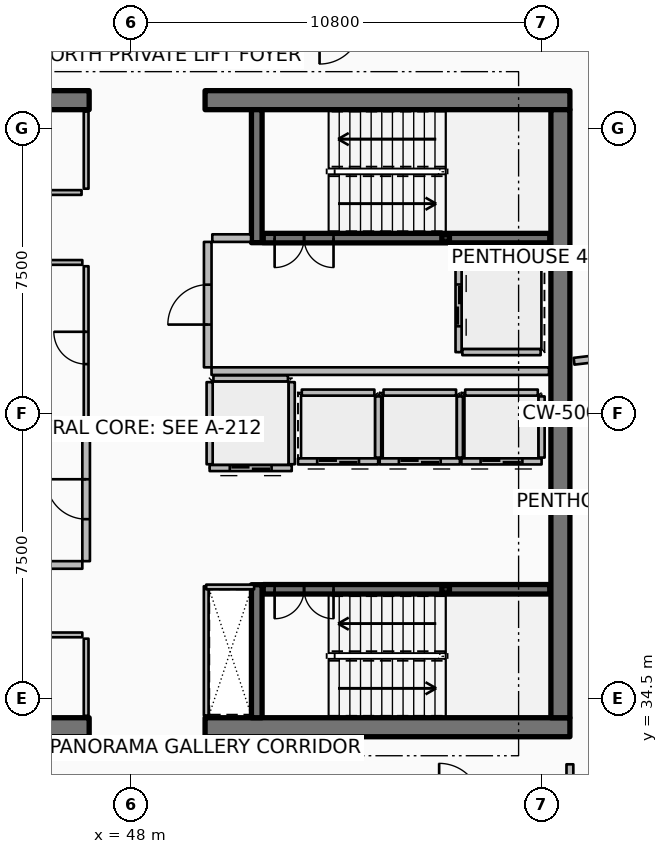
"""IFC4 building model, lengths in metres.
Left out: names, types, materials, properties, quantities, classifications, styles, units other than length and angle.
Written with IfcOpenShell. Run it as: python <this file> out.ifc"""

import sys

from ifc_helpers import new_model, si_unit, direction, frame, frame_2d, origin, origin_2d, place, context, subcontext, project, spatial, rectangle, hollow_rectangle, extrude, element, fill, save


model = new_model("IFC4")
c1 = context("Model", 3, precision=1e-05, world=origin(), true_north=direction((0.0, 1.0)))
c2 = subcontext(c1, "Body", "Model", "MODEL_VIEW")
j1 = project(units=[si_unit("LENGTHUNIT", "METRE"), si_unit("PLANEANGLEUNIT", "RADIAN")], contexts=[c1])
p1 = place(None, origin())
s1 = spatial("IfcSite", under=j1, at=p1, CompositionType="ELEMENT")
p2 = place(p1, origin())
s2 = spatial("IfcBuilding", under=s1, at=p2, CompositionType="ELEMENT")
p3 = place(p2, frame((0.0, 0.0, 338.9)))
s3 = spatial("IfcBuildingStorey", under=s2, at=p3, CompositionType="ELEMENT", Elevation=338.9)
p4 = place(p3, frame((37.3, 33.75, 0.0), z_axis=(0.0, 0.0, 1.0), x_axis=(1.0, 0.0, 0.0)))
e1 = element("IfcWall", 1, at=p4, inside=s3, PredefinedType="SHEAR", context=c2, shape_type="SweptSolid", body=[
    extrude(rectangle(XDim=9.6, YDim=0.5, at=frame_2d((4.8, 0.0))), origin(), (0.0, 0.0, 1.0), 4.2),
])
p5 = place(p3, frame((49.95, 33.75, 0.0), z_axis=(0.0, 0.0, 1.0), x_axis=(1.0, 0.0, 0.0)))
e2 = element("IfcWall", 2, at=p5, inside=s3, PredefinedType="SHEAR", context=c2, shape_type="SweptSolid", body=[
    extrude(rectangle(XDim=9.6, YDim=0.5, at=frame_2d((4.8, 0.0))), origin(), (0.0, 0.0, 1.0), 4.2),
])
p6 = place(p3, frame((37.3, 50.25, 0.0), z_axis=(0.0, 0.0, 1.0), x_axis=(1.0, 0.0, 0.0)))
e3 = element("IfcWall", 3, at=p6, inside=s3, PredefinedType="SHEAR", context=c2, shape_type="SweptSolid", body=[
    extrude(rectangle(XDim=9.6, YDim=0.5, at=frame_2d((4.8, 0.0))), origin(), (0.0, 0.0, 1.0), 4.2),
])
p7 = place(p3, frame((49.95, 50.25, 0.0), z_axis=(0.0, 0.0, 1.0), x_axis=(1.0, 0.0, 0.0)))
e4 = element("IfcWall", 4, at=p7, inside=s3, PredefinedType="SHEAR", context=c2, shape_type="SweptSolid", body=[
    extrude(rectangle(XDim=9.6, YDim=0.5, at=frame_2d((4.8, 0.0))), origin(), (0.0, 0.0, 1.0), 4.2),
])
p8 = place(p3, frame((59.3, 34.0, 0.0), z_axis=(0.0, 0.0, 1.0), x_axis=(0.0, 1.0, 0.0)))
e5 = element("IfcWall", 5, at=p8, inside=s3, PredefinedType="SHEAR", context=c2, shape_type="SweptSolid", body=[
    extrude(rectangle(XDim=16.0, YDim=0.5, at=frame_2d((8.0, 0.0))), origin(), (0.0, 0.0, 1.0), 4.2),
])
for number, where, z_axis, x_axis in (
    (6, (51.31, 46.5, 0.0), (0.0, 0.0, 1.0), (0.0, 1.0, 0.0)),
    (7, (51.31, 34.0, 0.0), (0.0, 0.0, 1.0), (0.0, 1.0, 0.0)),
):
    element("IfcWall", number, at=place(p3, frame(where, z_axis=z_axis, x_axis=x_axis)), inside=s3, PredefinedType="SHEAR", context=c2, shape_type="SweptSolid", body=[
        extrude(rectangle(XDim=3.5, YDim=0.28, at=frame_2d((1.75, 0.0))), origin(), (0.0, 0.0, 1.0), 4.2),
    ])
for number, where, z_axis, x_axis in (
    (8, (56.28, 46.62, 0.0), (0.0, 0.0, 1.0), (1.0, 0.0, 0.0)),
    (9, (56.28, 37.38, 0.0), (0.0, 0.0, 1.0), (1.0, 0.0, 0.0)),
):
    element("IfcColumn", number, at=place(p3, frame(where, z_axis=z_axis, x_axis=x_axis)), inside=s3, PredefinedType="COLUMN", context=c2, shape_type="SweptSolid", body=[
        extrude(hollow_rectangle(XDim=0.2, YDim=0.2, WallThickness=0.01, InnerFilletRadius=0.01, OuterFilletRadius=0.02, at=origin_2d()), origin(), (0.0, 0.0, 1.0), 1.895),
    ])
p9 = place(p3, frame((51.48, 46.62, 0.0), z_axis=(0.0, 0.0, 1.0), x_axis=(1.0, 0.0, 0.0)))
e10 = element("IfcWall", 10, at=p9, inside=s3, PredefinedType="SOLIDWALL", context=c2, shape_type="SweptSolid", body=[
    extrude(rectangle(XDim=7.54, YDim=0.25, at=frame_2d((3.77, 0.0))), origin(), (0.0, 0.0, 1.0), 3.8),
])
p10 = place(p9, frame((0.3, 0.0, 0.0)))
e11 = element("IfcOpeningElement", 11, at=p10, cuts=e10, PredefinedType="OPENING", context=c2, shape_type="SweptSolid", body=[
    extrude(rectangle(XDim=1.55, YDim=2.15, at=frame_2d((0.775, 1.075))), frame((0.0, 0.135, 0.0), z_axis=(0.0, -1.0, 0.0), x_axis=(1.0, 0.0, 0.0)), (0.0, 0.0, 1.0), 0.27),
])
p11 = place(p3, frame((51.48, 37.38, 0.0), z_axis=(0.0, 0.0, 1.0), x_axis=(1.0, 0.0, 0.0)))
e12 = element("IfcWall", 12, at=p11, inside=s3, PredefinedType="SOLIDWALL", context=c2, shape_type="SweptSolid", body=[
    extrude(rectangle(XDim=7.54, YDim=0.25, at=frame_2d((3.77, 0.0))), origin(), (0.0, 0.0, 1.0), 3.8),
])
p12 = place(p11, frame((0.3, 0.0, 0.0)))
e13 = element("IfcOpeningElement", 13, at=p12, cuts=e12, PredefinedType="OPENING", context=c2, shape_type="SweptSolid", body=[
    extrude(rectangle(XDim=1.55, YDim=2.15, at=frame_2d((0.775, 1.075))), frame((0.0, 0.135, 0.0), z_axis=(0.0, -1.0, 0.0), x_axis=(1.0, 0.0, 0.0)), (0.0, 0.0, 1.0), 0.27),
])
p13 = place(p3, frame((54.505, 40.745, 0.0), z_axis=(0.0, 0.0, 1.0), x_axis=(-1.0, 0.0, 0.0)))
e14 = element("IfcWall", 14, at=p13, inside=s3, PredefinedType="PARTITIONING", context=c2, shape_type="SweptSolid", body=[
    extrude(rectangle(XDim=2.11, YDim=0.16, at=frame_2d((1.055, 0.0))), origin(), (0.0, 0.0, 1.0), 3.8),
])
p14 = place(p13, frame((0.505, 0.0, 0.0)))
e15 = element("IfcOpeningElement", 15, at=p14, cuts=e14, PredefinedType="OPENING", context=c2, shape_type="SweptSolid", body=[
    extrude(rectangle(XDim=1.1, YDim=2.1, at=frame_2d((0.55, 1.05))), frame((0.0, 0.09, 0.0), z_axis=(0.0, -1.0, 0.0), x_axis=(1.0, 0.0, 0.0)), (0.0, 0.0, 1.0), 0.18),
])
p15 = place(p3, frame((54.505, 40.845, 0.0), z_axis=(0.0, 0.0, 1.0), x_axis=(0.0, 1.0, 0.0)))
e16 = element("IfcWall", 16, at=p15, inside=s3, PredefinedType="PARTITIONING", context=c2, shape_type="SweptSolid", body=[
    extrude(rectangle(XDim=1.61, YDim=0.16, at=frame_2d((0.805, 0.0))), origin(), (0.0, 0.0, 1.0), 3.8),
])
p16 = place(p3, frame((52.495, 42.555, 0.0), z_axis=(0.0, 0.0, 1.0), x_axis=(1.0, 0.0, 0.0)))
e17 = element("IfcWall", 17, at=p16, inside=s3, PredefinedType="PARTITIONING", context=c2, shape_type="SweptSolid", body=[
    extrude(rectangle(XDim=1.91, YDim=0.16, at=frame_2d((0.955, 0.0))), origin(), (0.0, 0.0, 1.0), 3.8),
])
p17 = place(p3, frame((56.655, 40.745, 0.0), z_axis=(0.0, 0.0, 1.0), x_axis=(-1.0, 0.0, 0.0)))
e18 = element("IfcWall", 18, at=p17, inside=s3, PredefinedType="PARTITIONING", context=c2, shape_type="SweptSolid", body=[
    extrude(rectangle(XDim=2.11, YDim=0.16, at=frame_2d((1.055, 0.0))), origin(), (0.0, 0.0, 1.0), 3.8),
])
p18 = place(p17, frame((0.505, 0.0, 0.0)))
e19 = element("IfcOpeningElement", 19, at=p18, cuts=e18, PredefinedType="OPENING", context=c2, shape_type="SweptSolid", body=[
    extrude(rectangle(XDim=1.1, YDim=2.1, at=frame_2d((0.55, 1.05))), frame((0.0, 0.09, 0.0), z_axis=(0.0, -1.0, 0.0), x_axis=(1.0, 0.0, 0.0)), (0.0, 0.0, 1.0), 0.18),
])
p19 = place(p3, frame((56.655, 40.845, 0.0), z_axis=(0.0, 0.0, 1.0), x_axis=(0.0, 1.0, 0.0)))
e20 = element("IfcWall", 20, at=p19, inside=s3, PredefinedType="PARTITIONING", context=c2, shape_type="SweptSolid", body=[
    extrude(rectangle(XDim=1.61, YDim=0.16, at=frame_2d((0.805, 0.0))), origin(), (0.0, 0.0, 1.0), 3.8),
])
p20 = place(p3, frame((54.645, 42.555, 0.0), z_axis=(0.0, 0.0, 1.0), x_axis=(1.0, 0.0, 0.0)))
e21 = element("IfcWall", 21, at=p20, inside=s3, PredefinedType="PARTITIONING", context=c2, shape_type="SweptSolid", body=[
    extrude(rectangle(XDim=1.91, YDim=0.16, at=frame_2d((0.955, 0.0))), origin(), (0.0, 0.0, 1.0), 3.8),
])
p21 = place(p3, frame((58.805, 40.745, 0.0), z_axis=(0.0, 0.0, 1.0), x_axis=(-1.0, 0.0, 0.0)))
e22 = element("IfcWall", 22, at=p21, inside=s3, PredefinedType="PARTITIONING", context=c2, shape_type="SweptSolid", body=[
    extrude(rectangle(XDim=2.11, YDim=0.16, at=frame_2d((1.055, 0.0))), origin(), (0.0, 0.0, 1.0), 3.8),
])
p22 = place(p21, frame((0.505, 0.0, 0.0)))
e23 = element("IfcOpeningElement", 23, at=p22, cuts=e22, PredefinedType="OPENING", context=c2, shape_type="SweptSolid", body=[
    extrude(rectangle(XDim=1.1, YDim=2.1, at=frame_2d((0.55, 1.05))), frame((0.0, 0.09, 0.0), z_axis=(0.0, -1.0, 0.0), x_axis=(1.0, 0.0, 0.0)), (0.0, 0.0, 1.0), 0.18),
])
p23 = place(p3, frame((58.805, 40.845, 0.0), z_axis=(0.0, 0.0, 1.0), x_axis=(0.0, 1.0, 0.0)))
e24 = element("IfcWall", 24, at=p23, inside=s3, PredefinedType="PARTITIONING", context=c2, shape_type="SweptSolid", body=[
    extrude(rectangle(XDim=1.61, YDim=0.16, at=frame_2d((0.805, 0.0))), origin(), (0.0, 0.0, 1.0), 3.8),
])
p24 = place(p3, frame((56.795, 42.555, 0.0), z_axis=(0.0, 0.0, 1.0), x_axis=(1.0, 0.0, 0.0)))
e25 = element("IfcWall", 25, at=p24, inside=s3, PredefinedType="PARTITIONING", context=c2, shape_type="SweptSolid", body=[
    extrude(rectangle(XDim=1.91, YDim=0.16, at=frame_2d((0.955, 0.0))), origin(), (0.0, 0.0, 1.0), 3.8),
])
p25 = place(p3, frame((56.62, 46.08, 0.0), z_axis=(0.0, 0.0, 1.0), x_axis=(0.0, -1.0, 0.0)))
e26 = element("IfcWall", 26, at=p25, inside=s3, PredefinedType="PARTITIONING", context=c2, shape_type="SweptSolid", body=[
    extrude(rectangle(XDim=2.46, YDim=0.16, at=frame_2d((1.23, 0.0))), origin(), (0.0, 0.0, 1.0), 3.8),
])
p26 = place(p25, frame((0.68, 0.0, 0.0)))
e27 = element("IfcOpeningElement", 27, at=p26, cuts=e26, PredefinedType="OPENING", context=c2, shape_type="SweptSolid", body=[
    extrude(rectangle(XDim=1.1, YDim=2.1, at=frame_2d((0.55, 1.05))), frame((0.0, 0.09, 0.0), z_axis=(0.0, -1.0, 0.0), x_axis=(1.0, 0.0, 0.0)), (0.0, 0.0, 1.0), 0.18),
])
for number, where, z_axis, x_axis in (
    (28, (56.72, 46.08, 0.0), (0.0, 0.0, 1.0), (1.0, 0.0, 0.0)),
    (29, (56.72, 43.62, 0.0), (0.0, 0.0, 1.0), (1.0, 0.0, 0.0)),
):
    element("IfcWall", number, at=place(p3, frame(where, z_axis=z_axis, x_axis=x_axis)), inside=s3, PredefinedType="PARTITIONING", context=c2, shape_type="SweptSolid", body=[
        extrude(rectangle(XDim=2.06, YDim=0.16, at=frame_2d((1.03, 0.0))), origin(), (0.0, 0.0, 1.0), 3.8),
    ])
p27 = place(p3, frame((52.23, 40.57, 0.0), z_axis=(0.0, 0.0, 1.0), x_axis=(-1.0, 0.0, 0.0)))
e30 = element("IfcWall", 30, at=p27, inside=s3, PredefinedType="PARTITIONING", context=c2, shape_type="SweptSolid", body=[
    extrude(rectangle(XDim=2.16, YDim=0.16, at=frame_2d((1.08, 0.0))), origin(), (0.0, 0.0, 1.0), 3.8),
])
p28 = place(p27, frame((0.53, 0.0, 0.0)))
e31 = element("IfcOpeningElement", 31, at=p28, cuts=e30, PredefinedType="OPENING", context=c2, shape_type="SweptSolid", body=[
    extrude(rectangle(XDim=1.1, YDim=2.1, at=frame_2d((0.55, 1.05))), frame((0.0, 0.09, 0.0), z_axis=(0.0, -1.0, 0.0), x_axis=(1.0, 0.0, 0.0)), (0.0, 0.0, 1.0), 0.18),
])
for number, where, z_axis, x_axis in (
    (32, (52.23, 40.67, 0.0), (0.0, 0.0, 1.0), (0.0, 1.0, 0.0)),
    (33, (50.07, 40.67, 0.0), (0.0, 0.0, 1.0), (0.0, 1.0, 0.0)),
):
    element("IfcWall", number, at=place(p3, frame(where, z_axis=z_axis, x_axis=x_axis)), inside=s3, PredefinedType="PARTITIONING", context=c2, shape_type="SweptSolid", body=[
        extrude(rectangle(XDim=2.16, YDim=0.16, at=frame_2d((1.08, 0.0))), origin(), (0.0, 0.0, 1.0), 3.8),
    ])
p29 = place(p3, frame((50.17, 42.93, 0.0), z_axis=(0.0, 0.0, 1.0), x_axis=(1.0, 0.0, 0.0)))
e34 = element("IfcWall", 34, at=p29, inside=s3, PredefinedType="PARTITIONING", context=c2, shape_type="SweptSolid", body=[
    extrude(rectangle(XDim=1.96, YDim=0.16, at=frame_2d((0.98, 0.0))), origin(), (0.0, 0.0, 1.0), 3.8),
])
p30 = place(p3, frame((46.82, 34.05, 0.0), z_axis=(0.0, 0.0, 1.0), x_axis=(0.0, 1.0, 0.0)))
e35 = element("IfcWall", 35, at=p30, inside=s3, PredefinedType="PARTITIONING", context=c2, shape_type="SweptSolid", body=[
    extrude(rectangle(XDim=2.03, YDim=0.125, at=frame_2d((1.015, 0.0))), origin(), (0.0, 0.0, 1.0), 3.24),
])
p31 = place(p3, frame((42.6, 36.18, 0.0), z_axis=(0.0, 0.0, 1.0), x_axis=(1.0, 0.0, 0.0)))
e36 = element("IfcWall", 36, at=p31, inside=s3, PredefinedType="PARTITIONING", context=c2, shape_type="SweptSolid", body=[
    extrude(rectangle(XDim=4.12, YDim=0.125, at=frame_2d((2.06, 0.0))), origin(), (0.0, 0.0, 1.0), 3.24),
])
p32 = place(p31, frame((1.635, 0.0, 0.0)))
e37 = element("IfcOpeningElement", 37, at=p32, cuts=e36, PredefinedType="OPENING", context=c2, shape_type="SweptSolid", body=[
    extrude(rectangle(XDim=0.85, YDim=2.06, at=frame_2d((0.425, 1.03))), frame((0.0, 0.073, 0.0), z_axis=(0.0, -1.0, 0.0), x_axis=(1.0, 0.0, 0.0)), (0.0, 0.0, 1.0), 0.145),
])
p33 = place(p3, frame((46.82, 47.92, 0.0), z_axis=(0.0, 0.0, 1.0), x_axis=(0.0, 1.0, 0.0)))
e38 = element("IfcWall", 38, at=p33, inside=s3, PredefinedType="PARTITIONING", context=c2, shape_type="SweptSolid", body=[
    extrude(rectangle(XDim=2.03, YDim=0.125, at=frame_2d((1.015, 0.0))), origin(), (0.0, 0.0, 1.0), 3.24),
])
p34 = place(p3, frame((37.92, 47.82, 0.0), z_axis=(0.0, 0.0, 1.0), x_axis=(1.0, 0.0, 0.0)))
e39 = element("IfcWall", 39, at=p34, inside=s3, PredefinedType="PARTITIONING", context=c2, shape_type="SweptSolid", body=[
    extrude(rectangle(XDim=8.78, YDim=0.125, at=frame_2d((4.39, 0.0))), origin(), (0.0, 0.0, 1.0), 3.24),
])
p35 = place(p34, frame((3.965, 0.0, 0.0)))
e40 = element("IfcOpeningElement", 40, at=p35, cuts=e39, PredefinedType="OPENING", context=c2, shape_type="SweptSolid", body=[
    extrude(rectangle(XDim=0.85, YDim=2.06, at=frame_2d((0.425, 1.03))), frame((0.0, 0.073, 0.0), z_axis=(0.0, -1.0, 0.0), x_axis=(1.0, 0.0, 0.0)), (0.0, 0.0, 1.0), 0.145),
])
p36 = place(p3, frame((41.35, 38.02, 0.0), z_axis=(0.0, 0.0, 1.0), x_axis=(1.0, 0.0, 0.0)))
e41 = element("IfcWall", 41, at=p36, inside=s3, PredefinedType="PARTITIONING", context=c2, shape_type="SweptSolid", body=[
    extrude(rectangle(XDim=5.37, YDim=0.2, at=frame_2d((2.685, 0.0))), origin(), (0.0, 0.0, 1.0), 3.8),
])
p37 = place(p3, frame((43.92, 41.48, 0.0), z_axis=(0.0, 0.0, 1.0), x_axis=(1.0, 0.0, 0.0)))
e42 = element("IfcWall", 42, at=p37, inside=s3, PredefinedType="PARTITIONING", context=c2, shape_type="SweptSolid", body=[
    extrude(rectangle(XDim=2.8, YDim=0.2, at=frame_2d((1.4, 0.0))), origin(), (0.0, 0.0, 1.0), 3.8),
])
p38 = place(p3, frame((46.82, 38.12, 0.0), z_axis=(0.0, 0.0, 1.0), x_axis=(0.0, 1.0, 0.0)))
e43 = element("IfcWall", 43, at=p38, inside=s3, PredefinedType="PARTITIONING", context=c2, shape_type="SweptSolid", body=[
    extrude(rectangle(XDim=3.26, YDim=0.2, at=frame_2d((1.63, 0.0))), origin(), (0.0, 0.0, 1.0), 3.8),
])
p39 = place(p38, frame((1.105, 0.0, 0.0)))
e44 = element("IfcOpeningElement", 44, at=p39, cuts=e43, PredefinedType="OPENING", context=c2, shape_type="SweptSolid", body=[
    extrude(rectangle(XDim=1.05, YDim=2.1, at=frame_2d((0.525, 1.05))), frame((0.0, 0.11, 0.0), z_axis=(0.0, -1.0, 0.0), x_axis=(1.0, 0.0, 0.0)), (0.0, 0.0, 1.0), 0.22),
])
p40 = place(p3, frame((50.12, 43.12, 0.0), z_axis=(0.0, 0.0, 1.0), x_axis=(1.0, 0.0, 0.0)))
e45 = element("IfcWall", 45, at=p40, inside=s3, PredefinedType="PARTITIONING", context=c2, shape_type="SweptSolid", body=[
    extrude(rectangle(XDim=8.88, YDim=0.2, at=frame_2d((4.44, 0.0))), origin(), (0.0, 0.0, 1.0), 3.8),
])
p41 = place(p3, frame((50.14, 46.62, 0.0), z_axis=(0.0, 0.0, 1.0), x_axis=(1.0, 0.0, 0.0)))
e46 = element("IfcWall", 46, at=p41, inside=s3, PredefinedType="PARTITIONING", context=c2, shape_type="SweptSolid", body=[
    extrude(rectangle(XDim=1.02, YDim=0.2, at=frame_2d((0.51, 0.0))), origin(), (0.0, 0.0, 1.0), 3.8),
])
p42 = place(p3, frame((50.02, 43.22, 0.0), z_axis=(0.0, 0.0, 1.0), x_axis=(0.0, 1.0, 0.0)))
e47 = element("IfcWall", 47, at=p42, inside=s3, PredefinedType="PARTITIONING", context=c2, shape_type="SweptSolid", body=[
    extrude(rectangle(XDim=3.3, YDim=0.2, at=frame_2d((1.65, 0.0))), origin(), (0.0, 0.0, 1.0), 3.8),
])
p43 = place(p42, frame((1.125, 0.0, 0.0)))
e48 = element("IfcOpeningElement", 48, at=p43, cuts=e47, PredefinedType="OPENING", context=c2, shape_type="SweptSolid", body=[
    extrude(rectangle(XDim=1.05, YDim=2.1, at=frame_2d((0.525, 1.05))), frame((0.0, 0.11, 0.0), z_axis=(0.0, -1.0, 0.0), x_axis=(1.0, 0.0, 0.0)), (0.0, 0.0, 1.0), 0.22),
])
p44 = place(p3, frame((41.36, 45.98, 0.0), z_axis=(0.0, 0.0, 1.0), x_axis=(1.0, 0.0, 0.0)))
e49 = element("IfcWall", 49, at=p44, inside=s3, PredefinedType="PARTITIONING", context=c2, shape_type="SweptSolid", body=[
    extrude(rectangle(XDim=5.36, YDim=0.125, at=frame_2d((2.68, 0.0))), origin(), (0.0, 0.0, 1.0), 3.24),
])
p45 = place(p3, frame((49.98, 34.06, 0.0), z_axis=(0.0, 0.0, 1.0), x_axis=(0.0, 1.0, 0.0)))
e50 = element("IfcWall", 50, at=p45, inside=s3, PredefinedType="PARTITIONING", context=c2, shape_type="SweptSolid", body=[
    extrude(rectangle(XDim=3.4, YDim=0.125, at=frame_2d((1.7, 0.0))), origin(), (0.0, 0.0, 1.0), 3.24),
])
p46 = place(p3, frame((49.98, 37.44, 0.0), z_axis=(0.0, 0.0, 1.0), x_axis=(1.0, 0.0, 0.0)))
e51 = element("IfcWall", 51, at=p46, inside=s3, PredefinedType="PARTITIONING", context=c2, shape_type="SweptSolid", body=[
    extrude(rectangle(XDim=1.26, YDim=0.125, at=frame_2d((0.63, 0.0))), origin(), (0.0, 0.0, 1.0), 3.24),
])
p47 = place(p3, frame((46.82, 41.58, 0.0), z_axis=(0.0, 0.0, 1.0), x_axis=(0.0, 1.0, 0.0)))
e52 = element("IfcWall", 52, at=p47, inside=s3, PredefinedType="PARTITIONING", context=c2, shape_type="SweptSolid", body=[
    extrude(rectangle(XDim=4.3, YDim=0.125, at=frame_2d((2.15, 0.0))), origin(), (0.0, 0.0, 1.0), 3.24),
])
p48 = place(p47, frame((1.725, 0.0, 0.0)))
e53 = element("IfcOpeningElement", 53, at=p48, cuts=e52, PredefinedType="OPENING", context=c2, shape_type="SweptSolid", body=[
    extrude(rectangle(XDim=0.85, YDim=2.06, at=frame_2d((0.425, 1.03))), frame((0.0, 0.073, 0.0), z_axis=(0.0, -1.0, 0.0), x_axis=(1.0, 0.0, 0.0)), (0.0, 0.0, 1.0), 0.145),
])
p49 = place(p3, frame((59.659, 43.38, 0.0), z_axis=(0.0, 0.0, 1.0), x_axis=(0.993068307517, 0.117538660041, 0.0)))
e54 = element("IfcWall", 54, at=p49, inside=s3, PredefinedType="PARTITIONING", context=c2, shape_type="SweptSolid", body=[
    extrude(rectangle(XDim=14.095, YDim=0.18, at=frame_2d((7.048, 0.0))), origin(), (0.0, 0.0, 1.0), 3.24),
])
p50 = place(p3, frame((59.55, 31.82, 0.0), z_axis=(0.0, 0.0, 1.0), x_axis=(0.0, 1.0, 0.0)))
e55 = element("IfcWall", 55, at=p50, inside=s3, PredefinedType="PARTITIONING", context=c2, shape_type="SweptSolid", body=[
    extrude(rectangle(XDim=0.955, YDim=0.18, at=frame_2d((0.477, 0.0))), origin(), (0.0, 0.0, 1.0), 3.24),
])
p51 = place(p10, origin())
e56 = element("IfcDoor", 56, at=p51, inside=s3, OperationType="DOUBLE_DOOR_SINGLE_SWING", PredefinedType="DOOR", context=c2, shape_type="SweptSolid", body=[
    extrude(rectangle(XDim=1.55, YDim=2.15, at=frame_2d((0.775, 1.075))), frame((0.0, 0.025, 0.0), z_axis=(0.0, -1.0, 0.0), x_axis=(1.0, 0.0, 0.0)), (0.0, 0.0, 1.0), 0.05),
])
fill(e11, e56)
p52 = place(p12, origin())
e57 = element("IfcDoor", 57, at=p52, inside=s3, OperationType="DOUBLE_DOOR_SINGLE_SWING", PredefinedType="DOOR", context=c2, shape_type="SweptSolid", body=[
    extrude(rectangle(XDim=1.55, YDim=2.15, at=frame_2d((0.775, 1.075))), frame((0.0, 0.025, 0.0), z_axis=(0.0, -1.0, 0.0), x_axis=(1.0, 0.0, 0.0)), (0.0, 0.0, 1.0), 0.05),
])
fill(e13, e57)
p53 = place(p14, origin())
e58 = element("IfcDoor", 58, at=p53, inside=s3, OperationType="DOUBLE_DOOR_SLIDING", PredefinedType="DOOR", context=c2, shape_type="SweptSolid", body=[
    extrude(rectangle(XDim=1.1, YDim=2.1, at=frame_2d((0.55, 1.05))), frame((0.0, 0.025, 0.0), z_axis=(0.0, -1.0, 0.0), x_axis=(1.0, 0.0, 0.0)), (0.0, 0.0, 1.0), 0.05),
])
fill(e15, e58)
p54 = place(p18, origin())
e59 = element("IfcDoor", 59, at=p54, inside=s3, OperationType="DOUBLE_DOOR_SLIDING", PredefinedType="DOOR", context=c2, shape_type="SweptSolid", body=[
    extrude(rectangle(XDim=1.1, YDim=2.1, at=frame_2d((0.55, 1.05))), frame((0.0, 0.025, 0.0), z_axis=(0.0, -1.0, 0.0), x_axis=(1.0, 0.0, 0.0)), (0.0, 0.0, 1.0), 0.05),
])
fill(e19, e59)
p55 = place(p22, origin())
e60 = element("IfcDoor", 60, at=p55, inside=s3, OperationType="DOUBLE_DOOR_SLIDING", PredefinedType="DOOR", context=c2, shape_type="SweptSolid", body=[
    extrude(rectangle(XDim=1.1, YDim=2.1, at=frame_2d((0.55, 1.05))), frame((0.0, 0.025, 0.0), z_axis=(0.0, -1.0, 0.0), x_axis=(1.0, 0.0, 0.0)), (0.0, 0.0, 1.0), 0.05),
])
fill(e23, e60)
p56 = place(p26, origin())
e61 = element("IfcDoor", 61, at=p56, inside=s3, OperationType="DOUBLE_DOOR_SLIDING", PredefinedType="DOOR", context=c2, shape_type="SweptSolid", body=[
    extrude(rectangle(XDim=1.1, YDim=2.1, at=frame_2d((0.55, 1.05))), frame((0.0, 0.025, 0.0), z_axis=(0.0, -1.0, 0.0), x_axis=(1.0, 0.0, 0.0)), (0.0, 0.0, 1.0), 0.05),
])
fill(e27, e61)
p57 = place(p28, origin())
e62 = element("IfcDoor", 62, at=p57, inside=s3, OperationType="DOUBLE_DOOR_SLIDING", PredefinedType="DOOR", context=c2, shape_type="SweptSolid", body=[
    extrude(rectangle(XDim=1.1, YDim=2.1, at=frame_2d((0.55, 1.05))), frame((0.0, 0.025, 0.0), z_axis=(0.0, -1.0, 0.0), x_axis=(1.0, 0.0, 0.0)), (0.0, 0.0, 1.0), 0.05),
])
fill(e31, e62)
p58 = place(p39, origin())
e63 = element("IfcDoor", 63, at=p58, inside=s3, OperationType="SINGLE_SWING_RIGHT", PredefinedType="DOOR", context=c2, shape_type="SweptSolid", body=[
    extrude(rectangle(XDim=1.05, YDim=2.1, at=frame_2d((0.525, 1.05))), frame((0.0, 0.025, 0.0), z_axis=(0.0, -1.0, 0.0), x_axis=(1.0, 0.0, 0.0)), (0.0, 0.0, 1.0), 0.05),
])
fill(e44, e63)
p59 = place(p43, origin())
e64 = element("IfcDoor", 64, at=p59, inside=s3, OperationType="SINGLE_SWING_LEFT", PredefinedType="DOOR", context=c2, shape_type="SweptSolid", body=[
    extrude(rectangle(XDim=1.05, YDim=2.1, at=frame_2d((0.525, 1.05))), frame((0.0, 0.025, 0.0), z_axis=(0.0, -1.0, 0.0), x_axis=(1.0, 0.0, 0.0)), (0.0, 0.0, 1.0), 0.05),
])
fill(e48, e64)
p60 = place(p48, origin())
e65 = element("IfcDoor", 65, at=p60, inside=s3, OperationType="SINGLE_SWING_RIGHT", PredefinedType="DOOR", context=c2, shape_type="SweptSolid", body=[
    extrude(rectangle(XDim=0.85, YDim=2.06, at=frame_2d((0.425, 1.03))), frame((0.0, 0.025, 0.0), z_axis=(0.0, -1.0, 0.0), x_axis=(1.0, 0.0, 0.0)), (0.0, 0.0, 1.0), 0.05),
])
fill(e53, e65)
save(model, sys.argv[1])
